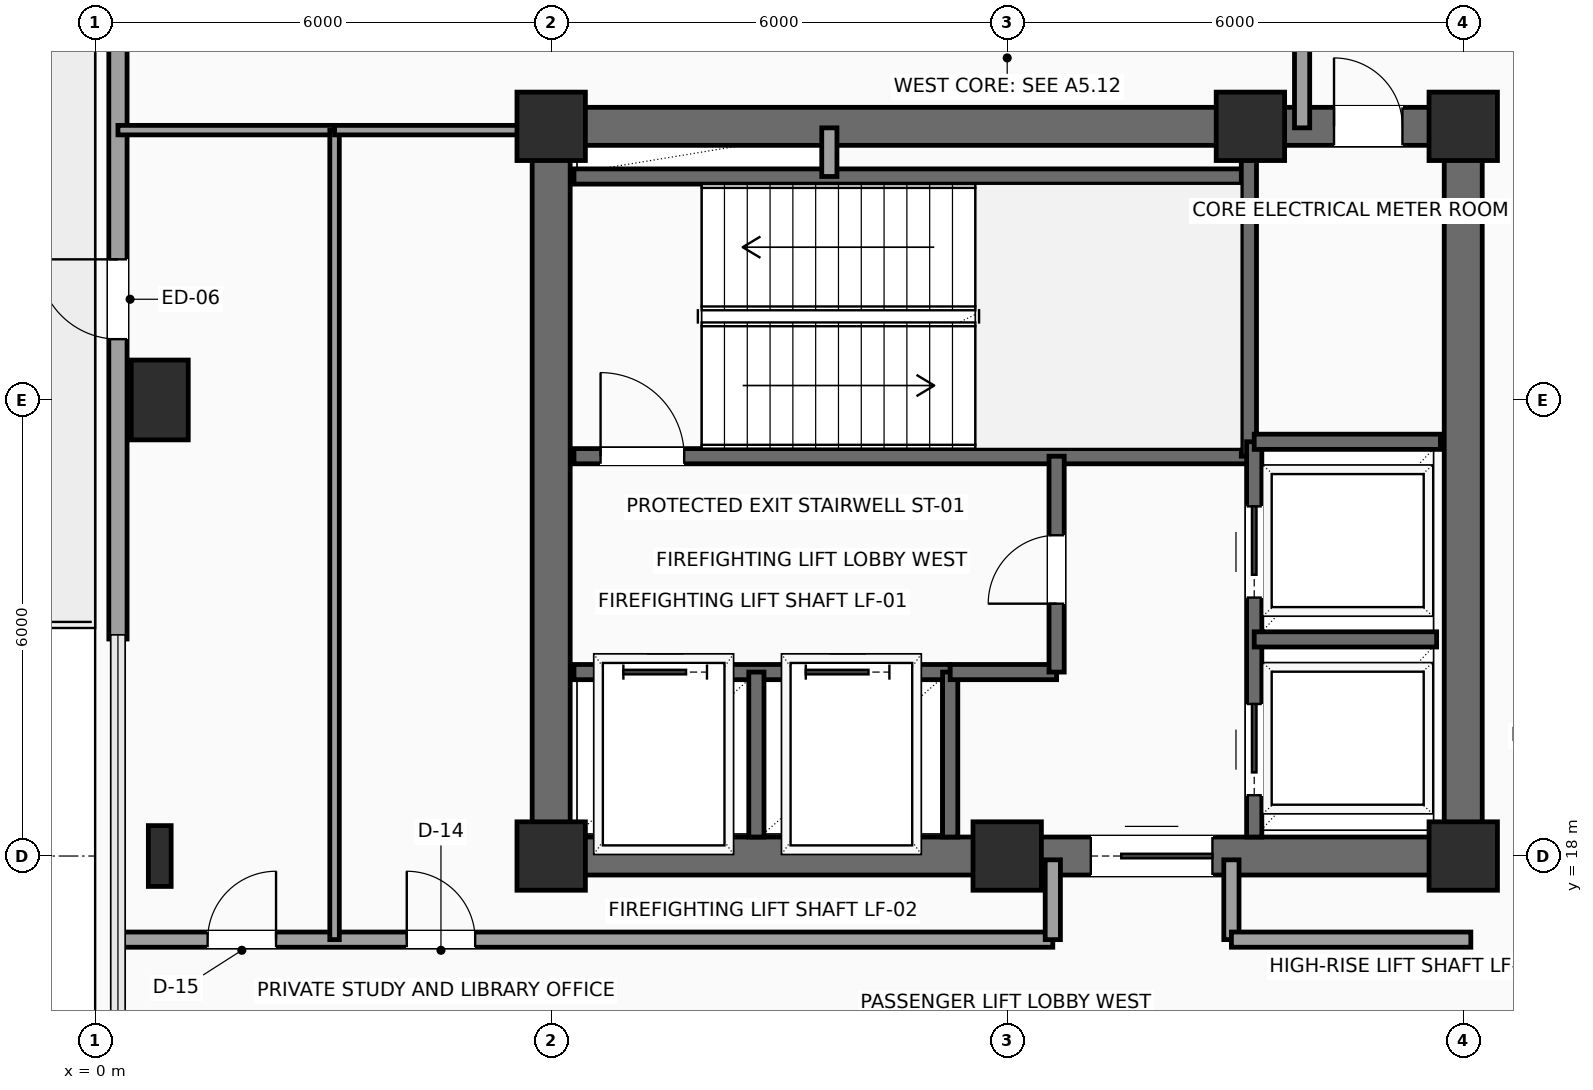
"""IFC4 building model, lengths in metres.
Left out: names, types, materials, properties, quantities, classifications, styles, units other than length and angle.
Written with IfcOpenShell. Run it as: python <this file> out.ifc"""

import sys

from ifc_helpers import new_model, si_unit, direction, frame, frame_2d, origin, origin_2d, place, context, subcontext, project, spatial, rectangle, i_section, extrude, element, fill, save


model = new_model("IFC4")
c1 = context("Model", 3, precision=1e-05, world=origin(), true_north=direction((0.0, 1.0)))
c2 = subcontext(c1, "Body", "Model", "MODEL_VIEW")
j1 = project(units=[si_unit("LENGTHUNIT", "METRE"), si_unit("PLANEANGLEUNIT", "RADIAN")], contexts=[c1])
p1 = place(None, origin())
s1 = spatial("IfcSite", under=j1, at=p1, CompositionType="ELEMENT")
p2 = place(p1, origin())
s2 = spatial("IfcBuilding", under=s1, at=p2, CompositionType="ELEMENT")
p3 = place(p2, frame((0.0, 0.0, 216.15)))
s3 = spatial("IfcBuildingStorey", under=s2, at=p3, CompositionType="ELEMENT", Elevation=216.15)
for number, where, z_axis, x_axis in (
    (1, (6.0, 18.0, 0.0), (0.0, 0.0, 1.0), (1.0, 0.0, 0.0)),
    (2, (12.0, 18.0, 0.0), (0.0, 0.0, 1.0), (1.0, 0.0, 0.0)),
    (3, (18.0, 18.0, 0.0), (0.0, 0.0, 1.0), (1.0, 0.0, 0.0)),
    (4, (6.0, 27.6, 0.0), (0.0, 0.0, 1.0), (1.0, 0.0, 0.0)),
    (5, (15.2, 27.6, 0.0), (0.0, 0.0, 1.0), (1.0, 0.0, 0.0)),
    (6, (18.0, 27.6, 0.0), (0.0, 0.0, 1.0), (1.0, 0.0, 0.0)),
):
    element("IfcColumn", number, at=place(p3, frame(where, z_axis=z_axis, x_axis=x_axis)), inside=s3, PredefinedType="COLUMN", context=c2, shape_type="SweptSolid", body=[
        extrude(rectangle(XDim=0.9, YDim=0.9, at=origin_2d()), origin(), (0.0, 0.0, 1.0), 3.75),
    ])
p4 = place(p3, frame((0.85, 18.0, 0.0), z_axis=(0.0, 0.0, 1.0), x_axis=(1.0, 0.0, 0.0)))
e7 = element("IfcColumn", 7, at=p4, inside=s3, PredefinedType="COLUMN", context=c2, shape_type="SweptSolid", body=[
    extrude(i_section(OverallWidth=0.3, OverallDepth=0.8, WebThickness=0.018, FlangeThickness=0.033, FilletRadius=0.03, at=origin_2d()), origin(), (0.0, 0.0, 1.0), 3.75),
])
p5 = place(p3, frame((0.85, 24.0, 0.0), z_axis=(0.0, 0.0, 1.0), x_axis=(1.0, 0.0, 0.0)))
e8 = element("IfcColumn", 8, at=p5, inside=s3, PredefinedType="COLUMN", context=c2, shape_type="SweptSolid", body=[
    extrude(rectangle(XDim=0.75, YDim=1.05, at=origin_2d()), origin(), (0.0, 0.0, 1.0), 3.75),
])
p6 = place(p3, frame((0.3, 20.855, 0.0), z_axis=(0.0, 0.0, 1.0), x_axis=(0.0, 1.0, 0.0)))
e9 = element("IfcWall", 9, at=p6, inside=s3, PredefinedType="SOLIDWALL", context=c2, shape_type="SweptSolid", body=[
    extrude(rectangle(XDim=9.29, YDim=0.24, at=frame_2d((4.645, 0.0))), origin(), (0.0, 0.0, 1.0), 3.54),
])
p7 = place(p6, frame((3.945, 0.0, 0.0)))
e10 = element("IfcOpeningElement", 10, at=p7, cuts=e9, PredefinedType="OPENING", context=c2, shape_type="SweptSolid", body=[
    extrude(rectangle(XDim=1.05, YDim=2.2, at=frame_2d((0.525, 1.1))), frame((0.0, 0.13, 0.0), z_axis=(0.0, -1.0, 0.0), x_axis=(1.0, 0.0, 0.0)), (0.0, 0.0, 1.0), 0.26),
])
p8 = place(p3, frame((6.0, 18.0, 0.0), z_axis=(0.0, 0.0, 1.0), x_axis=(1.0, 0.0, 0.0)))
e11 = element("IfcWall", 11, at=p8, inside=s3, PredefinedType="SHEAR", context=c2, shape_type="SweptSolid", body=[
    extrude(rectangle(XDim=12.0, YDim=0.5, at=frame_2d((6.0, 0.0))), origin(), (0.0, 0.0, 1.0), 3.54),
])
p9 = place(p8, frame((7.1, 0.0, 0.0)))
e12 = element("IfcOpeningElement", 12, at=p9, cuts=e11, PredefinedType="OPENING", context=c2, shape_type="SweptSolid", body=[
    extrude(rectangle(XDim=1.6, YDim=2.3, at=frame_2d((0.8, 1.15))), frame((0.0, 0.26, 0.0), z_axis=(0.0, -1.0, 0.0), x_axis=(1.0, 0.0, 0.0)), (0.0, 0.0, 1.0), 0.52),
])
p10 = place(p3, frame((6.0, 27.6, 0.0), z_axis=(0.0, 0.0, 1.0), x_axis=(1.0, 0.0, 0.0)))
e13 = element("IfcWall", 13, at=p10, inside=s3, PredefinedType="SHEAR", context=c2, shape_type="SweptSolid", body=[
    extrude(rectangle(XDim=12.0, YDim=0.5, at=frame_2d((6.0, 0.0))), origin(), (0.0, 0.0, 1.0), 3.54),
])
p11 = place(p10, frame((10.3, 0.0, 0.0)))
e14 = element("IfcOpeningElement", 14, at=p11, cuts=e13, PredefinedType="OPENING", context=c2, shape_type="SweptSolid", body=[
    extrude(rectangle(XDim=0.9, YDim=2.15, at=frame_2d((0.45, 1.075))), frame((0.0, 0.26, 0.0), z_axis=(0.0, -1.0, 0.0), x_axis=(1.0, 0.0, 0.0)), (0.0, 0.0, 1.0), 0.52),
])
for number, where, z_axis, x_axis in (
    (15, (6.0, 18.0, 0.0), (0.0, 0.0, 1.0), (0.0, 1.0, 0.0)),
    (16, (18.0, 18.0, 0.0), (0.0, 0.0, 1.0), (0.0, 1.0, 0.0)),
):
    element("IfcWall", number, at=place(p3, frame(where, z_axis=z_axis, x_axis=x_axis)), inside=s3, PredefinedType="SHEAR", context=c2, shape_type="SweptSolid", body=[
        extrude(rectangle(XDim=9.6, YDim=0.5, at=frame_2d((4.8, 0.0))), origin(), (0.0, 0.0, 1.0), 3.54),
    ])
p12 = place(p3, frame((6.3, 23.26, 0.0), z_axis=(0.0, 0.0, 1.0), x_axis=(1.0, 0.0, 0.0)))
e17 = element("IfcWall", 17, at=p12, inside=s3, PredefinedType="SHEAR", context=c2, shape_type="SweptSolid", body=[
    extrude(rectangle(XDim=8.88, YDim=0.2, at=frame_2d((4.44, 0.0))), origin(), (0.0, 0.0, 1.0), 3.54),
])
p13 = place(p12, frame((0.35, 0.0, 0.0)))
e18 = element("IfcOpeningElement", 18, at=p13, cuts=e17, PredefinedType="OPENING", context=c2, shape_type="SweptSolid", body=[
    extrude(rectangle(XDim=1.1, YDim=2.2, at=frame_2d((0.55, 1.1))), frame((0.0, 0.11, 0.0), z_axis=(0.0, -1.0, 0.0), x_axis=(1.0, 0.0, 0.0)), (0.0, 0.0, 1.0), 0.22),
])
p14 = place(p3, frame((6.3, 26.94, 0.0), z_axis=(0.0, 0.0, 1.0), x_axis=(1.0, 0.0, 0.0)))
e19 = element("IfcWall", 19, at=p14, inside=s3, PredefinedType="SHEAR", context=c2, shape_type="SweptSolid", body=[
    extrude(rectangle(XDim=8.88, YDim=0.2, at=frame_2d((4.44, 0.0))), origin(), (0.0, 0.0, 1.0), 3.54),
])
p15 = place(p3, frame((15.18, 23.26, 0.0), z_axis=(0.0, 0.0, 1.0), x_axis=(0.0, 1.0, 0.0)))
e20 = element("IfcWall", 20, at=p15, inside=s3, PredefinedType="SHEAR", context=c2, shape_type="SweptSolid", body=[
    extrude(rectangle(XDim=4.04, YDim=0.2, at=frame_2d((2.02, 0.0))), origin(), (0.0, 0.0, 1.0), 3.54),
])
p16 = place(p3, frame((6.3, 20.42, 0.0), z_axis=(0.0, 0.0, 1.0), x_axis=(1.0, 0.0, 0.0)))
e21 = element("IfcWall", 21, at=p16, inside=s3, PredefinedType="SHEAR", context=c2, shape_type="SweptSolid", body=[
    extrude(rectangle(XDim=4.95, YDim=0.2, at=frame_2d((2.475, 0.0))), origin(), (0.0, 0.0, 1.0), 3.54),
])
p17 = place(p16, frame((0.65, 0.0, 0.0)))
e22 = element("IfcOpeningElement", 22, at=p17, cuts=e21, PredefinedType="OPENING", context=c2, shape_type="SweptSolid", body=[
    extrude(rectangle(XDim=1.1, YDim=2.2, at=frame_2d((0.55, 1.1))), frame((0.0, 0.11, 0.0), z_axis=(0.0, -1.0, 0.0), x_axis=(1.0, 0.0, 0.0)), (0.0, 0.0, 1.0), 0.22),
])
p18 = place(p16, frame((3.05, 0.0, 0.0)))
e23 = element("IfcOpeningElement", 23, at=p18, cuts=e21, PredefinedType="OPENING", context=c2, shape_type="SweptSolid", body=[
    extrude(rectangle(XDim=1.1, YDim=2.2, at=frame_2d((0.55, 1.1))), frame((0.0, 0.11, 0.0), z_axis=(0.0, -1.0, 0.0), x_axis=(1.0, 0.0, 0.0)), (0.0, 0.0, 1.0), 0.22),
])
for number, where, z_axis, x_axis in (
    (24, (8.7, 18.25, 0.0), (0.0, 0.0, 1.0), (0.0, 1.0, 0.0)),
    (25, (11.25, 18.25, 0.0), (0.0, 0.0, 1.0), (0.0, 1.0, 0.0)),
):
    element("IfcWall", number, at=place(p3, frame(where, z_axis=z_axis, x_axis=x_axis)), inside=s3, PredefinedType="SHEAR", context=c2, shape_type="SweptSolid", body=[
        extrude(rectangle(XDim=2.17, YDim=0.2, at=frame_2d((1.085, 0.0))), origin(), (0.0, 0.0, 1.0), 3.54),
    ])
p19 = place(p3, frame((11.25, 20.42, 0.0), z_axis=(0.0, 0.0, 1.0), x_axis=(1.0, 0.0, 0.0)))
e26 = element("IfcWall", 26, at=p19, inside=s3, PredefinedType="SHEAR", context=c2, shape_type="SweptSolid", body=[
    extrude(rectangle(XDim=1.4, YDim=0.2, at=frame_2d((0.7, 0.0))), origin(), (0.0, 0.0, 1.0), 3.54),
])
p20 = place(p3, frame((12.65, 20.42, 0.0), z_axis=(0.0, 0.0, 1.0), x_axis=(0.0, 1.0, 0.0)))
e27 = element("IfcWall", 27, at=p20, inside=s3, PredefinedType="SHEAR", context=c2, shape_type="SweptSolid", body=[
    extrude(rectangle(XDim=2.84, YDim=0.2, at=frame_2d((1.42, 0.0))), origin(), (0.0, 0.0, 1.0), 3.54),
])
p21 = place(p20, frame((0.9, 0.0, 0.0)))
e28 = element("IfcOpeningElement", 28, at=p21, cuts=e27, PredefinedType="OPENING", context=c2, shape_type="SweptSolid", body=[
    extrude(rectangle(XDim=0.9, YDim=2.15, at=frame_2d((0.45, 1.075))), frame((0.0, 0.11, 0.0), z_axis=(0.0, -1.0, 0.0), x_axis=(1.0, 0.0, 0.0)), (0.0, 0.0, 1.0), 0.22),
])
p22 = place(p3, frame((9.66, 26.94, 0.0), z_axis=(0.0, 0.0, 1.0), x_axis=(0.0, 1.0, 0.0)))
e29 = element("IfcWall", 29, at=p22, inside=s3, PredefinedType="SOLIDWALL", context=c2, shape_type="SweptSolid", body=[
    extrude(rectangle(XDim=0.64, YDim=0.2, at=frame_2d((0.32, 0.0))), origin(), (0.0, 0.0, 1.0), 3.54),
])
p23 = place(p3, frame((15.25, 18.25, 0.0), z_axis=(0.0, 0.0, 1.0), x_axis=(0.0, 1.0, 0.0)))
e30 = element("IfcWall", 30, at=p23, inside=s3, PredefinedType="SHEAR", context=c2, shape_type="SweptSolid", body=[
    extrude(rectangle(XDim=5.2, YDim=0.2, at=frame_2d((2.6, 0.0))), origin(), (0.0, 0.0, 1.0), 3.54),
])
p24 = place(p23, frame((0.55, 0.0, 0.0)))
e31 = element("IfcOpeningElement", 31, at=p24, cuts=e30, PredefinedType="OPENING", context=c2, shape_type="SweptSolid", body=[
    extrude(rectangle(XDim=1.2, YDim=2.2, at=frame_2d((0.6, 1.1))), frame((0.0, 0.11, 0.0), z_axis=(0.0, -1.0, 0.0), x_axis=(1.0, 0.0, 0.0)), (0.0, 0.0, 1.0), 0.22),
])
p25 = place(p23, frame((3.15, 0.0, 0.0)))
e32 = element("IfcOpeningElement", 32, at=p25, cuts=e30, PredefinedType="OPENING", context=c2, shape_type="SweptSolid", body=[
    extrude(rectangle(XDim=1.2, YDim=2.2, at=frame_2d((0.6, 1.1))), frame((0.0, 0.11, 0.0), z_axis=(0.0, -1.0, 0.0), x_axis=(1.0, 0.0, 0.0)), (0.0, 0.0, 1.0), 0.22),
])
p26 = place(p3, frame((15.25, 20.85, 0.0), z_axis=(0.0, 0.0, 1.0), x_axis=(1.0, 0.0, 0.0)))
e33 = element("IfcWall", 33, at=p26, inside=s3, PredefinedType="SHEAR", context=c2, shape_type="SweptSolid", body=[
    extrude(rectangle(XDim=2.4, YDim=0.2, at=frame_2d((1.2, 0.0))), origin(), (0.0, 0.0, 1.0), 3.54),
])
p27 = place(p3, frame((15.25, 23.45, 0.0), z_axis=(0.0, 0.0, 1.0), x_axis=(1.0, 0.0, 0.0)))
e34 = element("IfcWall", 34, at=p27, inside=s3, PredefinedType="SHEAR", context=c2, shape_type="SweptSolid", body=[
    extrude(rectangle(XDim=2.45, YDim=0.2, at=frame_2d((1.225, 0.0))), origin(), (0.0, 0.0, 1.0), 3.54),
])
p28 = place(p3, frame((0.3, 16.9, 0.0), z_axis=(0.0, 0.0, 1.0), x_axis=(1.0, 0.0, 0.0)))
e35 = element("IfcWall", 35, at=p28, inside=s3, PredefinedType="PARTITIONING", context=c2, shape_type="SweptSolid", body=[
    extrude(rectangle(XDim=12.3, YDim=0.2, at=frame_2d((6.15, 0.0))), origin(), (0.0, 0.0, 1.0), 3.54),
])
p29 = place(p28, frame((1.18, 0.0, 0.0)))
e36 = element("IfcOpeningElement", 36, at=p29, cuts=e35, PredefinedType="OPENING", context=c2, shape_type="SweptSolid", body=[
    extrude(rectangle(XDim=0.9, YDim=2.1, at=frame_2d((0.45, 1.05))), frame((0.0, 0.11, 0.0), z_axis=(0.0, -1.0, 0.0), x_axis=(1.0, 0.0, 0.0)), (0.0, 0.0, 1.0), 0.22),
])
p30 = place(p28, frame((3.8, 0.0, 0.0)))
e37 = element("IfcOpeningElement", 37, at=p30, cuts=e35, PredefinedType="OPENING", context=c2, shape_type="SweptSolid", body=[
    extrude(rectangle(XDim=0.9, YDim=2.1, at=frame_2d((0.45, 1.05))), frame((0.0, 0.11, 0.0), z_axis=(0.0, -1.0, 0.0), x_axis=(1.0, 0.0, 0.0)), (0.0, 0.0, 1.0), 0.22),
])
for number, where, z_axis, x_axis in (
    (38, (12.6, 16.9, 0.0), (0.0, 0.0, 1.0), (0.0, 1.0, 0.0)),
    (39, (14.95, 17.95, 0.0), (0.0, 0.0, 1.0), (0.0, -1.0, 0.0)),
):
    element("IfcWall", number, at=place(p3, frame(where, z_axis=z_axis, x_axis=x_axis)), inside=s3, PredefinedType="PARTITIONING", context=c2, shape_type="SweptSolid", body=[
        extrude(rectangle(XDim=1.05, YDim=0.2, at=frame_2d((0.525, 0.0))), origin(), (0.0, 0.0, 1.0), 3.54),
    ])
p31 = place(p3, frame((14.95, 16.9, 0.0), z_axis=(0.0, 0.0, 1.0), x_axis=(1.0, 0.0, 0.0)))
e40 = element("IfcWall", 40, at=p31, inside=s3, PredefinedType="PARTITIONING", context=c2, shape_type="SweptSolid", body=[
    extrude(rectangle(XDim=3.15, YDim=0.2, at=frame_2d((1.575, 0.0))), origin(), (0.0, 0.0, 1.0), 3.54),
])
p32 = place(p3, frame((15.88, 27.58, 0.0), z_axis=(0.0, 0.0, 1.0), x_axis=(0.0, 1.0, 0.0)))
e41 = element("IfcWall", 41, at=p32, inside=s3, PredefinedType="PARTITIONING", context=c2, shape_type="SweptSolid", body=[
    extrude(rectangle(XDim=2.67, YDim=0.2, at=frame_2d((1.335, 0.0))), origin(), (0.0, 0.0, 1.0), 3.54),
])
p33 = place(p3, frame((0.3, 27.55, 0.0), z_axis=(0.0, 0.0, 1.0), x_axis=(1.0, 0.0, 0.0)))
e42 = element("IfcWall", 42, at=p33, inside=s3, PredefinedType="PARTITIONING", context=c2, shape_type="SweptSolid", body=[
    extrude(rectangle(XDim=2.85, YDim=0.125, at=frame_2d((1.425, 0.0))), origin(), (0.0, 0.0, 1.0), 3.54),
])
p34 = place(p3, frame((3.15, 16.9, 0.0), z_axis=(0.0, 0.0, 1.0), x_axis=(0.0, 1.0, 0.0)))
e43 = element("IfcWall", 43, at=p34, inside=s3, PredefinedType="PARTITIONING", context=c2, shape_type="SweptSolid", body=[
    extrude(rectangle(XDim=10.65, YDim=0.125, at=frame_2d((5.325, 0.0))), origin(), (0.0, 0.0, 1.0), 3.54),
])
p35 = place(p3, frame((3.15, 27.55, 0.0), z_axis=(0.0, 0.0, 1.0), x_axis=(1.0, 0.0, 0.0)))
e44 = element("IfcWall", 44, at=p35, inside=s3, PredefinedType="PARTITIONING", context=c2, shape_type="SweptSolid", body=[
    extrude(rectangle(XDim=2.8, YDim=0.125, at=frame_2d((1.4, 0.0))), origin(), (0.0, 0.0, 1.0), 3.54),
])
p36 = place(p7, origin())
e45 = element("IfcDoor", 45, at=p36, inside=s3, OperationType="SINGLE_SWING_RIGHT", PredefinedType="DOOR", context=c2, shape_type="SweptSolid", body=[
    extrude(rectangle(XDim=1.05, YDim=2.2, at=frame_2d((0.525, 1.1))), frame((0.0, 0.025, 0.0), z_axis=(0.0, -1.0, 0.0), x_axis=(1.0, 0.0, 0.0)), (0.0, 0.0, 1.0), 0.05),
])
fill(e10, e45)
p37 = place(p9, origin())
e46 = element("IfcDoor", 46, at=p37, inside=s3, OperationType="DOUBLE_DOOR_SLIDING", PredefinedType="DOOR", context=c2, shape_type="SweptSolid", body=[
    extrude(rectangle(XDim=1.6, YDim=2.3, at=frame_2d((0.8, 1.15))), frame((0.0, 0.025, 0.0), z_axis=(0.0, -1.0, 0.0), x_axis=(1.0, 0.0, 0.0)), (0.0, 0.0, 1.0), 0.05),
])
fill(e12, e46)
p38 = place(p11, origin())
e47 = element("IfcDoor", 47, at=p38, inside=s3, OperationType="SINGLE_SWING_LEFT", PredefinedType="DOOR", context=c2, shape_type="SweptSolid", body=[
    extrude(rectangle(XDim=0.9, YDim=2.15, at=frame_2d((0.45, 1.075))), frame((0.0, 0.025, 0.0), z_axis=(0.0, -1.0, 0.0), x_axis=(1.0, 0.0, 0.0)), (0.0, 0.0, 1.0), 0.05),
])
fill(e14, e47)
p39 = place(p13, origin())
e48 = element("IfcDoor", 48, at=p39, inside=s3, OperationType="SINGLE_SWING_LEFT", PredefinedType="DOOR", context=c2, shape_type="SweptSolid", body=[
    extrude(rectangle(XDim=1.1, YDim=2.2, at=frame_2d((0.55, 1.1))), frame((0.0, 0.025, 0.0), z_axis=(0.0, -1.0, 0.0), x_axis=(1.0, 0.0, 0.0)), (0.0, 0.0, 1.0), 0.05),
])
fill(e18, e48)
p40 = place(p17, origin())
e49 = element("IfcDoor", 49, at=p40, inside=s3, OperationType="SLIDING_TO_LEFT", PredefinedType="DOOR", context=c2, shape_type="SweptSolid", body=[
    extrude(rectangle(XDim=1.1, YDim=2.2, at=frame_2d((0.55, 1.1))), frame((0.0, 0.025, 0.0), z_axis=(0.0, -1.0, 0.0), x_axis=(1.0, 0.0, 0.0)), (0.0, 0.0, 1.0), 0.05),
])
fill(e22, e49)
p41 = place(p18, origin())
e50 = element("IfcDoor", 50, at=p41, inside=s3, OperationType="SLIDING_TO_LEFT", PredefinedType="DOOR", context=c2, shape_type="SweptSolid", body=[
    extrude(rectangle(XDim=1.1, YDim=2.2, at=frame_2d((0.55, 1.1))), frame((0.0, 0.025, 0.0), z_axis=(0.0, -1.0, 0.0), x_axis=(1.0, 0.0, 0.0)), (0.0, 0.0, 1.0), 0.05),
])
fill(e23, e50)
p42 = place(p21, origin())
e51 = element("IfcDoor", 51, at=p42, inside=s3, OperationType="SINGLE_SWING_LEFT", PredefinedType="DOOR", context=c2, shape_type="SweptSolid", body=[
    extrude(rectangle(XDim=0.9, YDim=2.15, at=frame_2d((0.45, 1.075))), frame((0.0, 0.025, 0.0), z_axis=(0.0, -1.0, 0.0), x_axis=(1.0, 0.0, 0.0)), (0.0, 0.0, 1.0), 0.05),
])
fill(e28, e51)
p43 = place(p24, origin())
e52 = element("IfcDoor", 52, at=p43, inside=s3, OperationType="SLIDING_TO_RIGHT", PredefinedType="DOOR", context=c2, shape_type="SweptSolid", body=[
    extrude(rectangle(XDim=1.2, YDim=2.2, at=frame_2d((0.6, 1.1))), frame((0.0, 0.025, 0.0), z_axis=(0.0, -1.0, 0.0), x_axis=(1.0, 0.0, 0.0)), (0.0, 0.0, 1.0), 0.05),
])
fill(e31, e52)
p44 = place(p25, origin())
e53 = element("IfcDoor", 53, at=p44, inside=s3, OperationType="SLIDING_TO_RIGHT", PredefinedType="DOOR", context=c2, shape_type="SweptSolid", body=[
    extrude(rectangle(XDim=1.2, YDim=2.2, at=frame_2d((0.6, 1.1))), frame((0.0, 0.025, 0.0), z_axis=(0.0, -1.0, 0.0), x_axis=(1.0, 0.0, 0.0)), (0.0, 0.0, 1.0), 0.05),
])
fill(e32, e53)
p45 = place(p29, origin())
e54 = element("IfcDoor", 54, at=p45, inside=s3, OperationType="SINGLE_SWING_RIGHT", PredefinedType="DOOR", context=c2, shape_type="SweptSolid", body=[
    extrude(rectangle(XDim=0.9, YDim=2.1, at=frame_2d((0.45, 1.05))), frame((0.0, 0.025, 0.0), z_axis=(0.0, -1.0, 0.0), x_axis=(1.0, 0.0, 0.0)), (0.0, 0.0, 1.0), 0.05),
])
fill(e36, e54)
p46 = place(p30, origin())
e55 = element("IfcDoor", 55, at=p46, inside=s3, OperationType="SINGLE_SWING_LEFT", PredefinedType="DOOR", context=c2, shape_type="SweptSolid", body=[
    extrude(rectangle(XDim=0.9, YDim=2.1, at=frame_2d((0.45, 1.05))), frame((0.0, 0.025, 0.0), z_axis=(0.0, -1.0, 0.0), x_axis=(1.0, 0.0, 0.0)), (0.0, 0.0, 1.0), 0.05),
])
fill(e37, e55)
save(model, sys.argv[1])
